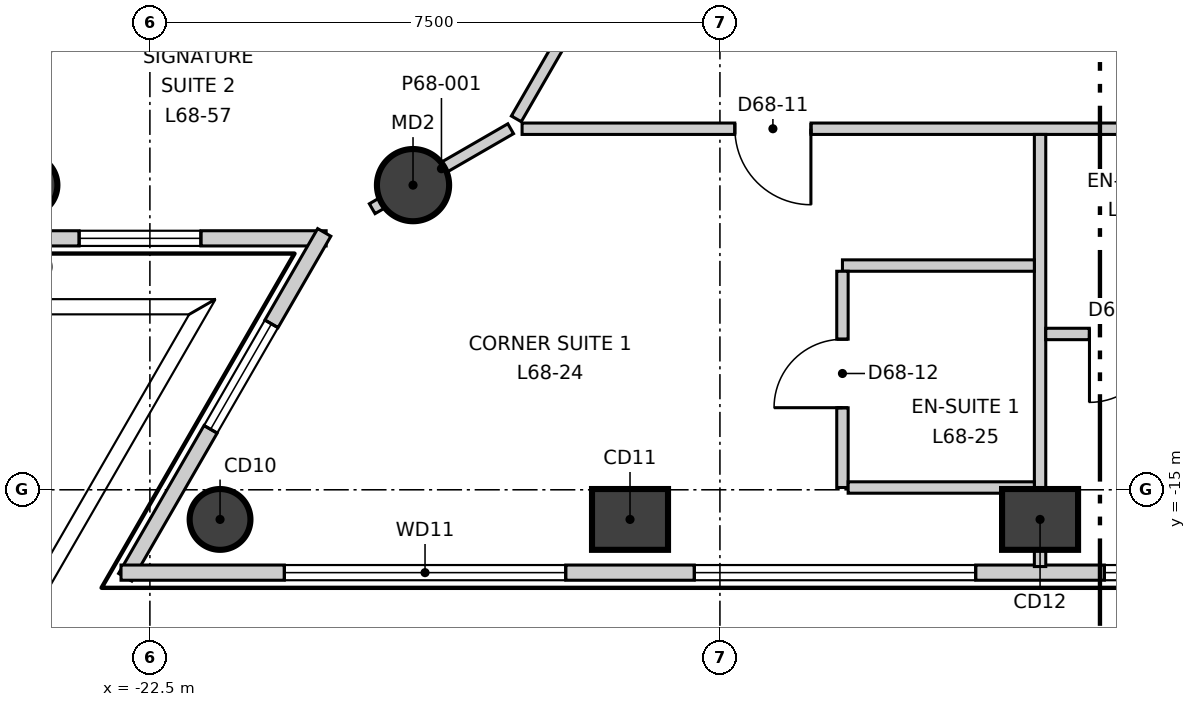
"""IFC4 building model, lengths in metres.
Left out: names, types, materials, properties, quantities, classifications, styles, units other than length and angle.
Written with IfcOpenShell. Run it as: python <this file> out.ifc"""

import sys

from ifc_helpers import new_model, si_unit, direction, frame, frame_2d, origin, origin_2d, place, context, subcontext, project, spatial, rectangle, circle, extrude, element, fill, save


model = new_model("IFC4")
c1 = context("Model", 3, precision=1e-05, world=origin(), true_north=direction((0.0, 1.0)))
c2 = subcontext(c1, "Body", "Model", "MODEL_VIEW")
j1 = project(units=[si_unit("LENGTHUNIT", "METRE"), si_unit("PLANEANGLEUNIT", "RADIAN")], contexts=[c1])
p1 = place(None, origin())
s1 = spatial("IfcSite", under=j1, at=p1, CompositionType="ELEMENT")
p2 = place(p1, origin())
s2 = spatial("IfcBuilding", under=s1, at=p2, CompositionType="ELEMENT")
p3 = place(p2, frame((0.0, 0.0, 289.9)))
s3 = spatial("IfcBuildingStorey", under=s2, at=p3, CompositionType="ELEMENT", Elevation=289.9)
for number, where, z_axis, x_axis in (
    (1, (-24.117, -10.992, -0.3), (0.0, 0.0, 1.0), (0.5, 0.866, 0.0)),
    (2, (-21.577, -15.39, -0.3), (0.0, 0.0, 1.0), (1.0, 0.0, 0.0)),
):
    element("IfcColumn", number, at=place(p3, frame(where, z_axis=z_axis, x_axis=x_axis)), inside=s3, PredefinedType="COLUMN", context=c2, shape_type="SweptSolid", body=[
        extrude(circle(Radius=0.4, at=origin_2d()), origin(), (0.0, 0.0, 1.0), 3.6),
    ])
for number, where, z_axis, x_axis in (
    (3, (-16.183, -15.39, -0.3), (0.0, 0.0, 1.0), (1.0, 0.0, 0.0)),
    (4, (-10.788, -15.39, -0.3), (0.0, 0.0, 1.0), (1.0, 0.0, 0.0)),
):
    element("IfcColumn", number, at=place(p3, frame(where, z_axis=z_axis, x_axis=x_axis)), inside=s3, PredefinedType="COLUMN", context=c2, shape_type="SweptSolid", body=[
        extrude(rectangle(XDim=1.0, YDim=0.8, at=origin_2d()), origin(), (0.0, 0.0, 1.0), 3.6),
    ])
p4 = place(p3, frame((-19.038, -10.992, -0.3), z_axis=(0.0, 0.0, 1.0), x_axis=(1.0, 0.0, 0.0)))
e5 = element("IfcColumn", 5, at=p4, inside=s3, PredefinedType="COLUMN", context=c2, shape_type="SweptSolid", body=[
    extrude(circle(Radius=0.475, at=origin_2d()), origin(), (0.0, 0.0, 1.0), 3.6),
])
p5 = place(p3, frame((-2.494, 27.86, 0.0), z_axis=(0.0, 0.0, 1.0), x_axis=(-0.500008134474, -0.866020707292, 0.0)))
e6 = element("IfcWall", 6, at=p5, inside=s3, PredefinedType="ELEMENTEDWALL", context=c2, shape_type="SweptSolid", body=[
    extrude(rectangle(XDim=45.741, YDim=0.2, at=frame_2d((22.871, 0.0))), origin(), (0.0, 0.0, 1.0), 3.3),
])
p6 = place(p5, frame((2.15, 0.0, 0.9)))
e7 = element("IfcOpeningElement", 7, at=p6, cuts=e6, PredefinedType="OPENING", context=c2, shape_type="SweptSolid", body=[
    extrude(rectangle(XDim=3.7, YDim=2.2, at=frame_2d((1.85, 1.1))), frame((0.0, 0.11, 0.0), z_axis=(0.0, -1.0, 0.0), x_axis=(1.0, 0.0, 0.0)), (0.0, 0.0, 1.0), 0.22),
])
p7 = place(p5, frame((7.544, 0.0, 0.9)))
e8 = element("IfcOpeningElement", 8, at=p7, cuts=e6, PredefinedType="OPENING", context=c2, shape_type="SweptSolid", body=[
    extrude(rectangle(XDim=3.7, YDim=2.2, at=frame_2d((1.85, 1.1))), frame((0.0, 0.11, 0.0), z_axis=(0.0, -1.0, 0.0), x_axis=(1.0, 0.0, 0.0)), (0.0, 0.0, 1.0), 0.22),
])
p8 = place(p5, frame((12.939, 0.0, 0.9)))
e9 = element("IfcOpeningElement", 9, at=p8, cuts=e6, PredefinedType="OPENING", context=c2, shape_type="SweptSolid", body=[
    extrude(rectangle(XDim=3.7, YDim=2.2, at=frame_2d((1.85, 1.1))), frame((0.0, 0.11, 0.0), z_axis=(0.0, -1.0, 0.0), x_axis=(1.0, 0.0, 0.0)), (0.0, 0.0, 1.0), 0.22),
])
p9 = place(p5, frame((18.333, 0.0, 0.9)))
e10 = element("IfcOpeningElement", 10, at=p9, cuts=e6, PredefinedType="OPENING", context=c2, shape_type="SweptSolid", body=[
    extrude(rectangle(XDim=3.7, YDim=2.2, at=frame_2d((1.85, 1.1))), frame((0.0, 0.11, 0.0), z_axis=(0.0, -1.0, 0.0), x_axis=(1.0, 0.0, 0.0)), (0.0, 0.0, 1.0), 0.22),
])
p10 = place(p5, frame((23.728, 0.0, 0.9)))
e11 = element("IfcOpeningElement", 11, at=p10, cuts=e6, PredefinedType="OPENING", context=c2, shape_type="SweptSolid", body=[
    extrude(rectangle(XDim=3.7, YDim=2.2, at=frame_2d((1.85, 1.1))), frame((0.0, 0.11, 0.0), z_axis=(0.0, -1.0, 0.0), x_axis=(1.0, 0.0, 0.0)), (0.0, 0.0, 1.0), 0.22),
])
p11 = place(p5, frame((29.122, 0.0, 0.9)))
e12 = element("IfcOpeningElement", 12, at=p11, cuts=e6, PredefinedType="OPENING", context=c2, shape_type="SweptSolid", body=[
    extrude(rectangle(XDim=3.7, YDim=2.2, at=frame_2d((1.85, 1.1))), frame((0.0, 0.11, 0.0), z_axis=(0.0, -1.0, 0.0), x_axis=(1.0, 0.0, 0.0)), (0.0, 0.0, 1.0), 0.22),
])
p12 = place(p5, frame((34.517, 0.0, 0.9)))
e13 = element("IfcOpeningElement", 13, at=p12, cuts=e6, PredefinedType="OPENING", context=c2, shape_type="SweptSolid", body=[
    extrude(rectangle(XDim=3.7, YDim=2.2, at=frame_2d((1.85, 1.1))), frame((0.0, 0.11, 0.0), z_axis=(0.0, -1.0, 0.0), x_axis=(1.0, 0.0, 0.0)), (0.0, 0.0, 1.0), 0.22),
])
p13 = place(p5, frame((39.911, 0.0, 0.9)))
e14 = element("IfcOpeningElement", 14, at=p13, cuts=e6, PredefinedType="OPENING", context=c2, shape_type="SweptSolid", body=[
    extrude(rectangle(XDim=3.7, YDim=2.2, at=frame_2d((1.85, 1.1))), frame((0.0, 0.11, 0.0), z_axis=(0.0, -1.0, 0.0), x_axis=(1.0, 0.0, 0.0)), (0.0, 0.0, 1.0), 0.22),
])
p14 = place(p3, frame((-25.42, -11.692, 0.0), z_axis=(0.0, 0.0, 1.0), x_axis=(1.0, 0.0, 0.0)))
e15 = element("IfcWall", 15, at=p14, inside=s3, PredefinedType="ELEMENTEDWALL", context=c2, shape_type="SweptSolid", body=[
    extrude(rectangle(XDim=5.239, YDim=0.2, at=frame_2d((2.62, 0.0))), origin(), (0.0, 0.0, 1.0), 3.3),
])
p15 = place(p14, frame((1.99, 0.0, 0.9)))
e16 = element("IfcOpeningElement", 16, at=p15, cuts=e15, PredefinedType="OPENING", context=c2, shape_type="SweptSolid", body=[
    extrude(rectangle(XDim=1.6, YDim=2.2, at=frame_2d((0.8, 1.1))), frame((0.0, 0.11, 0.0), z_axis=(0.0, -1.0, 0.0), x_axis=(1.0, 0.0, 0.0)), (0.0, 0.0, 1.0), 0.22),
])
p16 = place(p3, frame((-20.206, -11.614, 0.0), z_axis=(0.0, 0.0, 1.0), x_axis=(-0.499933584342, -0.866063745487, 0.0)))
e17 = element("IfcWall", 17, at=p16, inside=s3, PredefinedType="ELEMENTEDWALL", context=c2, shape_type="SweptSolid", body=[
    extrude(rectangle(XDim=5.239, YDim=0.2, at=frame_2d((2.619, 0.0))), origin(), (0.0, 0.0, 1.0), 3.3),
])
p17 = place(p16, frame((1.39, 0.0, 0.9)))
e18 = element("IfcOpeningElement", 18, at=p17, cuts=e17, PredefinedType="OPENING", context=c2, shape_type="SweptSolid", body=[
    extrude(rectangle(XDim=1.6, YDim=2.2, at=frame_2d((0.8, 1.1))), frame((0.0, 0.11, 0.0), z_axis=(0.0, -1.0, 0.0), x_axis=(1.0, 0.0, 0.0)), (0.0, 0.0, 1.0), 0.22),
])
p18 = place(p3, frame((-22.88, -16.09, 0.0), z_axis=(0.0, 0.0, 1.0), x_axis=(1.0, 0.0, 0.0)))
e19 = element("IfcWall", 19, at=p18, inside=s3, PredefinedType="ELEMENTEDWALL", context=c2, shape_type="SweptSolid", body=[
    extrude(rectangle(XDim=45.74, YDim=0.2, at=frame_2d((22.87, 0.0))), origin(), (0.0, 0.0, 1.0), 3.3),
])
p19 = place(p18, frame((2.15, 0.0, 0.9)))
e20 = element("IfcOpeningElement", 20, at=p19, cuts=e19, PredefinedType="OPENING", context=c2, shape_type="SweptSolid", body=[
    extrude(rectangle(XDim=3.7, YDim=2.2, at=frame_2d((1.85, 1.1))), frame((0.0, 0.11, 0.0), z_axis=(0.0, -1.0, 0.0), x_axis=(1.0, 0.0, 0.0)), (0.0, 0.0, 1.0), 0.22),
])
p20 = place(p18, frame((7.544, 0.0, 0.9)))
e21 = element("IfcOpeningElement", 21, at=p20, cuts=e19, PredefinedType="OPENING", context=c2, shape_type="SweptSolid", body=[
    extrude(rectangle(XDim=3.7, YDim=2.2, at=frame_2d((1.85, 1.1))), frame((0.0, 0.11, 0.0), z_axis=(0.0, -1.0, 0.0), x_axis=(1.0, 0.0, 0.0)), (0.0, 0.0, 1.0), 0.22),
])
p21 = place(p18, frame((12.939, 0.0, 0.9)))
e22 = element("IfcOpeningElement", 22, at=p21, cuts=e19, PredefinedType="OPENING", context=c2, shape_type="SweptSolid", body=[
    extrude(rectangle(XDim=3.7, YDim=2.2, at=frame_2d((1.85, 1.1))), frame((0.0, 0.11, 0.0), z_axis=(0.0, -1.0, 0.0), x_axis=(1.0, 0.0, 0.0)), (0.0, 0.0, 1.0), 0.22),
])
p22 = place(p18, frame((18.333, 0.0, 0.9)))
e23 = element("IfcOpeningElement", 23, at=p22, cuts=e19, PredefinedType="OPENING", context=c2, shape_type="SweptSolid", body=[
    extrude(rectangle(XDim=3.7, YDim=2.2, at=frame_2d((1.85, 1.1))), frame((0.0, 0.11, 0.0), z_axis=(0.0, -1.0, 0.0), x_axis=(1.0, 0.0, 0.0)), (0.0, 0.0, 1.0), 0.22),
])
p23 = place(p18, frame((23.727, 0.0, 0.9)))
e24 = element("IfcOpeningElement", 24, at=p23, cuts=e19, PredefinedType="OPENING", context=c2, shape_type="SweptSolid", body=[
    extrude(rectangle(XDim=3.7, YDim=2.2, at=frame_2d((1.85, 1.1))), frame((0.0, 0.11, 0.0), z_axis=(0.0, -1.0, 0.0), x_axis=(1.0, 0.0, 0.0)), (0.0, 0.0, 1.0), 0.22),
])
p24 = place(p18, frame((29.121, 0.0, 0.9)))
e25 = element("IfcOpeningElement", 25, at=p24, cuts=e19, PredefinedType="OPENING", context=c2, shape_type="SweptSolid", body=[
    extrude(rectangle(XDim=3.7, YDim=2.2, at=frame_2d((1.85, 1.1))), frame((0.0, 0.11, 0.0), z_axis=(0.0, -1.0, 0.0), x_axis=(1.0, 0.0, 0.0)), (0.0, 0.0, 1.0), 0.22),
])
p25 = place(p18, frame((34.516, 0.0, 0.9)))
e26 = element("IfcOpeningElement", 26, at=p25, cuts=e19, PredefinedType="OPENING", context=c2, shape_type="SweptSolid", body=[
    extrude(rectangle(XDim=3.7, YDim=2.2, at=frame_2d((1.85, 1.1))), frame((0.0, 0.11, 0.0), z_axis=(0.0, -1.0, 0.0), x_axis=(1.0, 0.0, 0.0)), (0.0, 0.0, 1.0), 0.22),
])
p26 = place(p18, frame((39.91, 0.0, 0.9)))
e27 = element("IfcOpeningElement", 27, at=p26, cuts=e19, PredefinedType="OPENING", context=c2, shape_type="SweptSolid", body=[
    extrude(rectangle(XDim=3.7, YDim=2.2, at=frame_2d((1.85, 1.1))), frame((0.0, 0.11, 0.0), z_axis=(0.0, -1.0, 0.0), x_axis=(1.0, 0.0, 0.0)), (0.0, 0.0, 1.0), 0.22),
])
p27 = place(p3, frame((-19.575, -11.302, 0.0), z_axis=(0.0, 0.0, 1.0), x_axis=(0.866013598413, 0.500020446946, 0.0)))
e28 = element("IfcWall", 28, at=p27, inside=s3, PredefinedType="PARTITIONING", context=c2, shape_type="SweptSolid", body=[
    extrude(rectangle(XDim=2.104, YDim=0.15, at=frame_2d((1.052, 0.0))), origin(), (0.0, 0.0, 1.0), 2.8),
])
p28 = place(p3, frame((-17.603, -10.25, 0.0), z_axis=(0.0, 0.0, 1.0), x_axis=(1.0, 0.0, 0.0)))
e29 = element("IfcWall", 29, at=p28, inside=s3, PredefinedType="PARTITIONING", context=c2, shape_type="SweptSolid", body=[
    extrude(rectangle(XDim=35.356, YDim=0.15, at=frame_2d((17.678, 0.0))), origin(), (0.0, 0.0, 1.0), 3.3),
])
p29 = place(p28, frame((2.8, 0.0, 0.0)))
e30 = element("IfcOpeningElement", 30, at=p29, cuts=e29, PredefinedType="OPENING", context=c2, shape_type="SweptSolid", body=[
    extrude(rectangle(XDim=1.0, YDim=2.1, at=frame_2d((0.5, 1.05))), frame((0.0, 0.085, 0.0), z_axis=(0.0, -1.0, 0.0), x_axis=(1.0, 0.0, 0.0)), (0.0, 0.0, 1.0), 0.17),
])
p30 = place(p28, frame((15.065, 0.0, 0.0)))
e31 = element("IfcOpeningElement", 31, at=p30, cuts=e29, PredefinedType="OPENING", context=c2, shape_type="SweptSolid", body=[
    extrude(rectangle(XDim=1.0, YDim=2.1, at=frame_2d((0.5, 1.05))), frame((0.0, 0.085, 0.0), z_axis=(0.0, -1.0, 0.0), x_axis=(1.0, 0.0, 0.0)), (0.0, 0.0, 1.0), 0.17),
])
p31 = place(p28, frame((9.765, 0.0, 0.0)))
e32 = element("IfcOpeningElement", 32, at=p31, cuts=e29, PredefinedType="OPENING", context=c2, shape_type="SweptSolid", body=[
    extrude(rectangle(XDim=0.9, YDim=2.1, at=frame_2d((0.45, 1.05))), frame((0.0, 0.085, 0.0), z_axis=(0.0, -1.0, 0.0), x_axis=(1.0, 0.0, 0.0)), (0.0, 0.0, 1.0), 0.17),
])
p32 = place(p28, frame((11.965, 0.0, 0.0)))
e33 = element("IfcOpeningElement", 33, at=p32, cuts=e29, PredefinedType="OPENING", context=c2, shape_type="SweptSolid", body=[
    extrude(rectangle(XDim=0.9, YDim=2.1, at=frame_2d((0.45, 1.05))), frame((0.0, 0.085, 0.0), z_axis=(0.0, -1.0, 0.0), x_axis=(1.0, 0.0, 0.0)), (0.0, 0.0, 1.0), 0.17),
])
p33 = place(p28, frame((20.953, 0.0, 0.0)))
e34 = element("IfcOpeningElement", 34, at=p33, cuts=e29, PredefinedType="OPENING", context=c2, shape_type="SweptSolid", body=[
    extrude(rectangle(XDim=1.0, YDim=2.1, at=frame_2d((0.5, 1.05))), frame((0.0, 0.085, 0.0), z_axis=(0.0, -1.0, 0.0), x_axis=(1.0, 0.0, 0.0)), (0.0, 0.0, 1.0), 0.17),
])
p34 = place(p28, frame((26.347, 0.0, 0.0)))
e35 = element("IfcOpeningElement", 35, at=p34, cuts=e29, PredefinedType="OPENING", context=c2, shape_type="SweptSolid", body=[
    extrude(rectangle(XDim=1.0, YDim=2.1, at=frame_2d((0.5, 1.05))), frame((0.0, 0.085, 0.0), z_axis=(0.0, -1.0, 0.0), x_axis=(1.0, 0.0, 0.0)), (0.0, 0.0, 1.0), 0.17),
])
p35 = place(p28, frame((31.342, 0.0, 0.0)))
e36 = element("IfcOpeningElement", 36, at=p35, cuts=e29, PredefinedType="OPENING", context=c2, shape_type="SweptSolid", body=[
    extrude(rectangle(XDim=1.0, YDim=2.1, at=frame_2d((0.5, 1.05))), frame((0.0, 0.085, 0.0), z_axis=(0.0, -1.0, 0.0), x_axis=(1.0, 0.0, 0.0)), (0.0, 0.0, 1.0), 0.17),
])
p36 = place(p3, frame((-17.679, -10.12, 0.0), z_axis=(0.0, 0.0, 1.0), x_axis=(0.500008955215, 0.866020233427, 0.0)))
e37 = element("IfcWall", 37, at=p36, inside=s3, PredefinedType="PARTITIONING", context=c2, shape_type="SweptSolid", body=[
    extrude(rectangle(XDim=35.357, YDim=0.15, at=frame_2d((17.679, 0.0))), origin(), (0.0, 0.0, 1.0), 3.3),
])
p37 = place(p36, frame((31.407, 0.0, 0.0)))
e38 = element("IfcOpeningElement", 38, at=p37, cuts=e37, PredefinedType="OPENING", context=c2, shape_type="SweptSolid", body=[
    extrude(rectangle(XDim=1.0, YDim=2.1, at=frame_2d((0.5, 1.05))), frame((0.0, 0.085, 0.0), z_axis=(0.0, -1.0, 0.0), x_axis=(1.0, 0.0, 0.0)), (0.0, 0.0, 1.0), 0.17),
])
p38 = place(p36, frame((25.642, 0.0, 0.0)))
e39 = element("IfcOpeningElement", 39, at=p38, cuts=e37, PredefinedType="OPENING", context=c2, shape_type="SweptSolid", body=[
    extrude(rectangle(XDim=1.0, YDim=2.1, at=frame_2d((0.5, 1.05))), frame((0.0, 0.085, 0.0), z_axis=(0.0, -1.0, 0.0), x_axis=(1.0, 0.0, 0.0)), (0.0, 0.0, 1.0), 0.17),
])
p39 = place(p36, frame((18.348, 0.0, 0.0)))
e40 = element("IfcOpeningElement", 40, at=p39, cuts=e37, PredefinedType="OPENING", context=c2, shape_type="SweptSolid", body=[
    extrude(rectangle(XDim=1.0, YDim=2.1, at=frame_2d((0.5, 1.05))), frame((0.0, 0.085, 0.0), z_axis=(0.0, -1.0, 0.0), x_axis=(1.0, 0.0, 0.0)), (0.0, 0.0, 1.0), 0.17),
])
p40 = place(p36, frame((13.254, 0.0, 0.0)))
e41 = element("IfcOpeningElement", 41, at=p40, cuts=e37, PredefinedType="OPENING", context=c2, shape_type="SweptSolid", body=[
    extrude(rectangle(XDim=1.0, YDim=2.1, at=frame_2d((0.5, 1.05))), frame((0.0, 0.085, 0.0), z_axis=(0.0, -1.0, 0.0), x_axis=(1.0, 0.0, 0.0)), (0.0, 0.0, 1.0), 0.17),
])
p41 = place(p36, frame((7.559, 0.0, 0.0)))
e42 = element("IfcOpeningElement", 42, at=p41, cuts=e37, PredefinedType="OPENING", context=c2, shape_type="SweptSolid", body=[
    extrude(rectangle(XDim=1.0, YDim=2.1, at=frame_2d((0.5, 1.05))), frame((0.0, 0.085, 0.0), z_axis=(0.0, -1.0, 0.0), x_axis=(1.0, 0.0, 0.0)), (0.0, 0.0, 1.0), 0.17),
])
p42 = place(p36, frame((2.865, 0.0, 0.0)))
e43 = element("IfcOpeningElement", 43, at=p42, cuts=e37, PredefinedType="OPENING", context=c2, shape_type="SweptSolid", body=[
    extrude(rectangle(XDim=1.0, YDim=2.1, at=frame_2d((0.5, 1.05))), frame((0.0, 0.085, 0.0), z_axis=(0.0, -1.0, 0.0), x_axis=(1.0, 0.0, 0.0)), (0.0, 0.0, 1.0), 0.17),
])
p43 = place(p3, frame((-10.788, -16.01, 0.0), z_axis=(0.0, 0.0, 1.0), x_axis=(0.0, 1.0, 0.0)))
e44 = element("IfcWall", 44, at=p43, inside=s3, PredefinedType="PARTITIONING", context=c2, shape_type="SweptSolid", body=[
    extrude(rectangle(XDim=5.685, YDim=0.15, at=frame_2d((2.843, 0.0))), origin(), (0.0, 0.0, 1.0), 3.3),
])
p44 = place(p3, frame((-13.388, -12.05, 0.0), z_axis=(0.0, 0.0, 1.0), x_axis=(1.0, 0.0, 0.0)))
e45 = element("IfcWall", 45, at=p44, inside=s3, PredefinedType="PARTITIONING", context=c2, shape_type="SweptSolid", body=[
    extrude(rectangle(XDim=2.525, YDim=0.15, at=frame_2d((1.262, 0.0))), origin(), (0.0, 0.0, 1.0), 3.3),
])
p45 = place(p3, frame((-13.388, -14.97, 0.0), z_axis=(0.0, 0.0, 1.0), x_axis=(0.0, 1.0, 0.0)))
e46 = element("IfcWall", 46, at=p45, inside=s3, PredefinedType="PARTITIONING", context=c2, shape_type="SweptSolid", body=[
    extrude(rectangle(XDim=2.845, YDim=0.15, at=frame_2d((1.422, 0.0))), origin(), (0.0, 0.0, 1.0), 3.3),
])
p46 = place(p45, frame((1.05, 0.0, 0.0)))
e47 = element("IfcOpeningElement", 47, at=p46, cuts=e46, PredefinedType="OPENING", context=c2, shape_type="SweptSolid", body=[
    extrude(rectangle(XDim=0.9, YDim=2.1, at=frame_2d((0.45, 1.05))), frame((0.0, 0.085, 0.0), z_axis=(0.0, -1.0, 0.0), x_axis=(1.0, 0.0, 0.0)), (0.0, 0.0, 1.0), 0.17),
])
p47 = place(p3, frame((-13.313, -14.97, 0.0), z_axis=(0.0, 0.0, 1.0), x_axis=(1.0, 0.0, 0.0)))
e48 = element("IfcWall", 48, at=p47, inside=s3, PredefinedType="PARTITIONING", context=c2, shape_type="SweptSolid", body=[
    extrude(rectangle(XDim=2.45, YDim=0.15, at=frame_2d((1.225, 0.0))), origin(), (0.0, 0.0, 1.0), 2.6),
])
p48 = place(p3, frame((-10.713, -12.95, 0.0), z_axis=(0.0, 0.0, 1.0), x_axis=(1.0, 0.0, 0.0)))
e49 = element("IfcWall", 49, at=p48, inside=s3, PredefinedType="PARTITIONING", context=c2, shape_type="SweptSolid", body=[
    extrude(rectangle(XDim=2.15, YDim=0.15, at=frame_2d((1.075, 0.0))), origin(), (0.0, 0.0, 1.0), 3.3),
])
p49 = place(p48, frame((0.575, 0.0, 0.0)))
e50 = element("IfcOpeningElement", 50, at=p49, cuts=e49, PredefinedType="OPENING", context=c2, shape_type="SweptSolid", body=[
    extrude(rectangle(XDim=0.9, YDim=2.1, at=frame_2d((0.45, 1.05))), frame((0.0, 0.085, 0.0), z_axis=(0.0, -1.0, 0.0), x_axis=(1.0, 0.0, 0.0)), (0.0, 0.0, 1.0), 0.17),
])
p50 = place(p13, origin())
e51 = element("IfcWindow", 51, at=p50, inside=s3, PartitioningType="SINGLE_PANEL", PredefinedType="WINDOW", context=c2, shape_type="SweptSolid", body=[
    extrude(rectangle(XDim=3.7, YDim=2.2, at=frame_2d((1.85, 1.1))), frame((0.0, 0.03, 0.0), z_axis=(0.0, -1.0, 0.0), x_axis=(1.0, 0.0, 0.0)), (0.0, 0.0, 1.0), 0.06),
])
fill(e14, e51)
p51 = place(p15, origin())
e52 = element("IfcWindow", 52, at=p51, inside=s3, PartitioningType="SINGLE_PANEL", PredefinedType="WINDOW", context=c2, shape_type="SweptSolid", body=[
    extrude(rectangle(XDim=1.6, YDim=2.2, at=frame_2d((0.8, 1.1))), frame((0.0, 0.03, 0.0), z_axis=(0.0, -1.0, 0.0), x_axis=(1.0, 0.0, 0.0)), (0.0, 0.0, 1.0), 0.06),
])
fill(e16, e52)
p52 = place(p17, origin())
e53 = element("IfcWindow", 53, at=p52, inside=s3, PartitioningType="SINGLE_PANEL", PredefinedType="WINDOW", context=c2, shape_type="SweptSolid", body=[
    extrude(rectangle(XDim=1.6, YDim=2.2, at=frame_2d((0.8, 1.1))), frame((0.0, 0.03, 0.0), z_axis=(0.0, -1.0, 0.0), x_axis=(1.0, 0.0, 0.0)), (0.0, 0.0, 1.0), 0.06),
])
fill(e18, e53)
p53 = place(p19, origin())
e54 = element("IfcWindow", 54, at=p53, inside=s3, PartitioningType="SINGLE_PANEL", PredefinedType="WINDOW", context=c2, shape_type="SweptSolid", body=[
    extrude(rectangle(XDim=3.7, YDim=2.2, at=frame_2d((1.85, 1.1))), frame((0.0, 0.03, 0.0), z_axis=(0.0, -1.0, 0.0), x_axis=(1.0, 0.0, 0.0)), (0.0, 0.0, 1.0), 0.06),
])
fill(e20, e54)
p54 = place(p20, origin())
e55 = element("IfcWindow", 55, at=p54, inside=s3, PartitioningType="SINGLE_PANEL", PredefinedType="WINDOW", context=c2, shape_type="SweptSolid", body=[
    extrude(rectangle(XDim=3.7, YDim=2.2, at=frame_2d((1.85, 1.1))), frame((0.0, 0.03, 0.0), z_axis=(0.0, -1.0, 0.0), x_axis=(1.0, 0.0, 0.0)), (0.0, 0.0, 1.0), 0.06),
])
fill(e21, e55)
p55 = place(p21, origin())
e56 = element("IfcWindow", 56, at=p55, inside=s3, PartitioningType="SINGLE_PANEL", PredefinedType="WINDOW", context=c2, shape_type="SweptSolid", body=[
    extrude(rectangle(XDim=3.7, YDim=2.2, at=frame_2d((1.85, 1.1))), frame((0.0, 0.03, 0.0), z_axis=(0.0, -1.0, 0.0), x_axis=(1.0, 0.0, 0.0)), (0.0, 0.0, 1.0), 0.06),
])
fill(e22, e56)
p56 = place(p29, origin())
e57 = element("IfcDoor", 57, at=p56, inside=s3, OperationType="SINGLE_SWING_RIGHT", PredefinedType="DOOR", context=c2, shape_type="SweptSolid", body=[
    extrude(rectangle(XDim=1.0, YDim=2.1, at=frame_2d((0.5, 1.05))), frame((0.0, 0.025, 0.0), z_axis=(0.0, -1.0, 0.0), x_axis=(1.0, 0.0, 0.0)), (0.0, 0.0, 1.0), 0.05),
])
fill(e30, e57)
p57 = place(p46, origin())
e58 = element("IfcDoor", 58, at=p57, inside=s3, OperationType="SINGLE_SWING_RIGHT", PredefinedType="DOOR", context=c2, shape_type="SweptSolid", body=[
    extrude(rectangle(XDim=0.9, YDim=2.1, at=frame_2d((0.45, 1.05))), frame((0.0, 0.025, 0.0), z_axis=(0.0, -1.0, 0.0), x_axis=(1.0, 0.0, 0.0)), (0.0, 0.0, 1.0), 0.05),
])
fill(e47, e58)
p58 = place(p49, origin())
e59 = element("IfcDoor", 59, at=p58, inside=s3, OperationType="SINGLE_SWING_LEFT", PredefinedType="DOOR", context=c2, shape_type="SweptSolid", body=[
    extrude(rectangle(XDim=0.9, YDim=2.1, at=frame_2d((0.45, 1.05))), frame((0.0, 0.025, 0.0), z_axis=(0.0, -1.0, 0.0), x_axis=(1.0, 0.0, 0.0)), (0.0, 0.0, 1.0), 0.05),
])
fill(e50, e59)
save(model, sys.argv[1])
